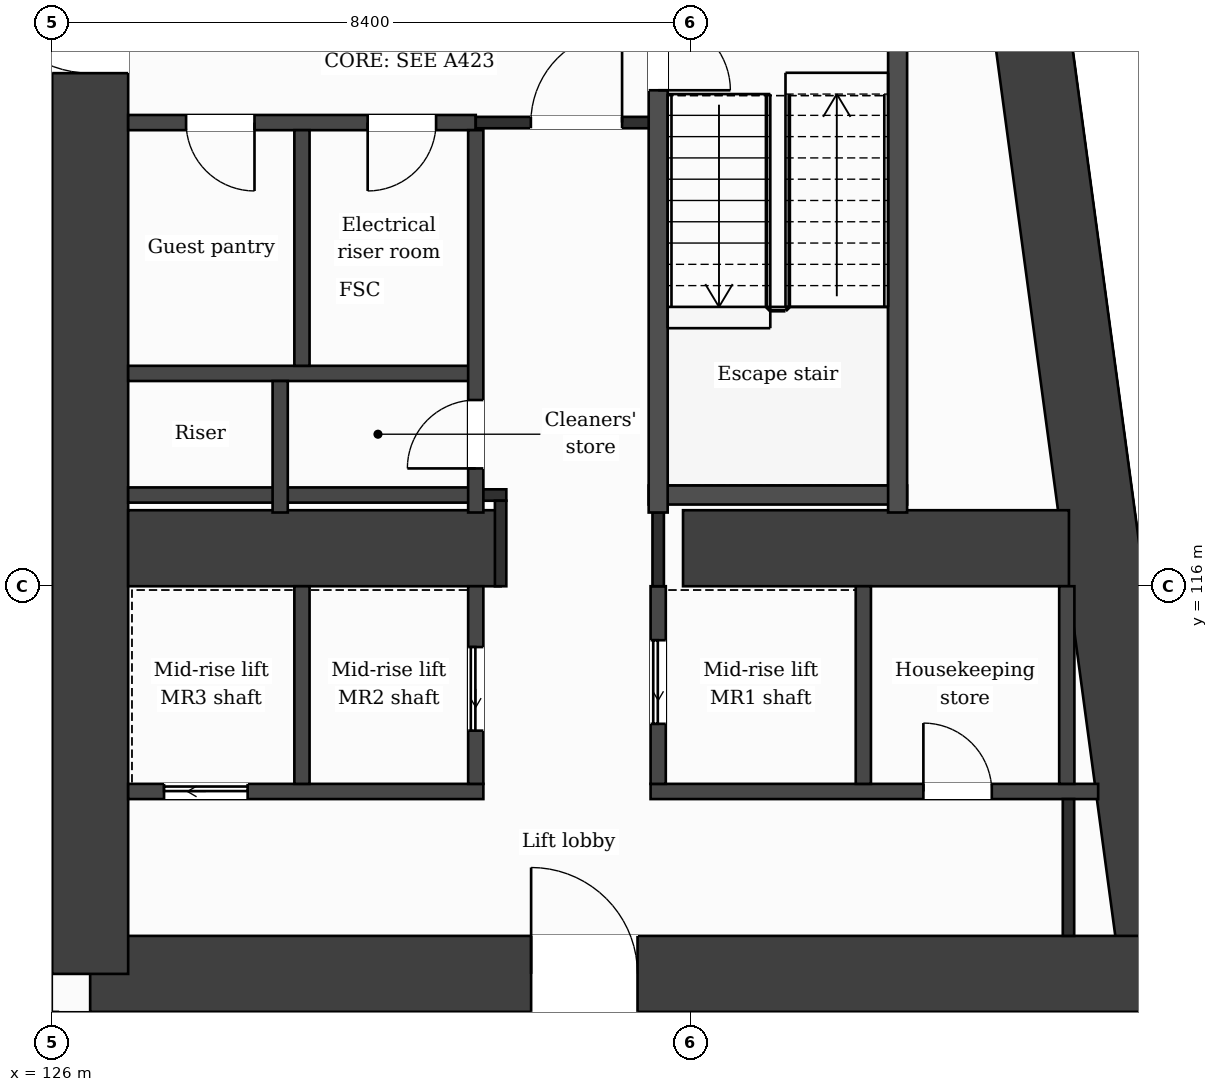
"""IFC4 building model, lengths in metres.
Left out: names, types, materials, properties, quantities, classifications, styles, units other than length and angle.
Written with IfcOpenShell. Run it as: python <this file> out.ifc"""

import sys

from ifc_helpers import new_model, si_unit, direction, frame, frame_2d, origin, place, context, subcontext, project, spatial, rectangle, extrude, element, fill, save


model = new_model("IFC4")
c1 = context("Model", 3, precision=1e-05, world=origin(), true_north=direction((0.0, 1.0)))
c2 = subcontext(c1, "Body", "Model", "MODEL_VIEW")
j1 = project(units=[si_unit("LENGTHUNIT", "METRE"), si_unit("PLANEANGLEUNIT", "RADIAN")], contexts=[c1])
p1 = place(None, origin())
s1 = spatial("IfcSite", under=j1, at=p1, CompositionType="ELEMENT")
p2 = place(p1, origin())
s2 = spatial("IfcBuilding", under=s1, at=p2, CompositionType="ELEMENT")
p3 = place(p2, frame((0.0, 0.0, 98.4)))
s3 = spatial("IfcBuildingStorey", under=s2, at=p3, CompositionType="ELEMENT", Elevation=98.4)
p4 = place(p3, frame((137.732, 131.9, 0.0), z_axis=(0.0, 0.0, 1.0), x_axis=(0.133411141623, -0.991060778808, 0.0)))
e1 = element("IfcWall", 1, at=p4, inside=s3, PredefinedType="SHEAR", context=c2, shape_type="SweptSolid", body=[
    extrude(rectangle(XDim=21.189, YDim=1.0, at=frame_2d((10.595, 0.0))), origin(), (0.0, 0.0, 1.0), 3.7),
])
p5 = place(p3, frame((140.559, 110.9, 0.0), z_axis=(0.0, 0.0, 1.0), x_axis=(-1.0, 0.0, 0.0)))
e2 = element("IfcWall", 2, at=p5, inside=s3, PredefinedType="SHEAR", context=c2, shape_type="SweptSolid", body=[
    extrude(rectangle(XDim=14.059, YDim=1.0, at=frame_2d((7.029, 0.0))), origin(), (0.0, 0.0, 1.0), 3.7),
])
p6 = place(p5, frame((6.858, 0.0, 0.0)))
e3 = element("IfcOpeningElement", 3, at=p6, cuts=e2, PredefinedType="OPENING", context=c2, shape_type="SweptSolid", body=[
    extrude(rectangle(XDim=1.4, YDim=2.1, at=frame_2d((0.7, 1.05))), frame((0.0, 0.51, 0.0), z_axis=(0.0, -1.0, 0.0), x_axis=(1.0, 0.0, 0.0)), (0.0, 0.0, 1.0), 1.02),
])
p7 = place(p3, frame((126.5, 110.9, 0.0), z_axis=(0.0, 0.0, 1.0), x_axis=(0.0, 1.0, 0.0)))
e4 = element("IfcWall", 4, at=p7, inside=s3, PredefinedType="SHEAR", context=c2, shape_type="SweptSolid", body=[
    extrude(rectangle(XDim=21.0, YDim=1.0, at=frame_2d((10.5, 0.0))), origin(), (0.0, 0.0, 1.0), 3.7),
])
p8 = place(p7, frame((11.85, 0.0, 0.0)))
e5 = element("IfcOpeningElement", 5, at=p8, cuts=e4, PredefinedType="OPENING", context=c2, shape_type="SweptSolid", body=[
    extrude(rectangle(XDim=1.4, YDim=2.1, at=frame_2d((0.7, 1.05))), frame((0.0, 0.51, 0.0), z_axis=(0.0, -1.0, 0.0), x_axis=(1.0, 0.0, 0.0)), (0.0, 0.0, 1.0), 1.02),
])
p9 = place(p3, frame((127.0, 116.5, 0.0), z_axis=(0.0, 0.0, 1.0), x_axis=(1.0, 0.0, 0.0)))
e6 = element("IfcWall", 6, at=p9, inside=s3, PredefinedType="SHEAR", context=c2, shape_type="SweptSolid", body=[
    extrude(rectangle(XDim=4.9, YDim=1.0, at=frame_2d((2.45, 0.0))), origin(), (0.0, 0.0, 1.0), 3.7),
])
p10 = place(p3, frame((134.3, 116.5, 0.0), z_axis=(0.0, 0.0, 1.0), x_axis=(1.0, 0.0, 0.0)))
e7 = element("IfcWall", 7, at=p10, inside=s3, PredefinedType="SHEAR", context=c2, shape_type="SweptSolid", body=[
    extrude(rectangle(XDim=5.077, YDim=1.0, at=frame_2d((2.539, 0.0))), origin(), (0.0, 0.0, 1.0), 3.7),
])
p11 = place(p3, frame((140.348, 103.85, 0.0), z_axis=(0.0, 0.0, 1.0), x_axis=(-0.133431549479, 0.991058031401, 0.0)))
e8 = element("IfcWall", 8, at=p11, inside=s3, PredefinedType="SOLIDWALL", context=c2, shape_type="SweptSolid", body=[
    extrude(rectangle(XDim=6.609, YDim=0.3, at=frame_2d((3.304, 0.0))), origin(), (0.0, 0.0, 1.0), 3.38),
])
p12 = place(p11, frame((0.737, 0.0, 0.9)))
e9 = element("IfcOpeningElement", 9, at=p12, cuts=e8, PredefinedType="OPENING", context=c2, shape_type="SweptSolid", body=[
    extrude(rectangle(XDim=1.2, YDim=2.1, at=frame_2d((0.6, 1.05))), frame((0.0, 0.16, 0.0), z_axis=(0.0, -1.0, 0.0), x_axis=(1.0, 0.0, 0.0)), (0.0, 0.0, 1.0), 0.32),
])
p13 = place(p11, frame((3.991, 0.0, 0.0)))
e10 = element("IfcOpeningElement", 10, at=p13, cuts=e8, PredefinedType="OPENING", context=c2, shape_type="SweptSolid", body=[
    extrude(rectangle(XDim=1.2, YDim=2.4, at=frame_2d((0.6, 1.2))), frame((0.0, 0.16, 0.0), z_axis=(0.0, -1.0, 0.0), x_axis=(1.0, 0.0, 0.0)), (0.0, 0.0, 1.0), 0.32),
])
p14 = place(p3, frame((127.0, 113.3, 0.0), z_axis=(0.0, 0.0, 1.0), x_axis=(1.0, 0.0, 0.0)))
e11 = element("IfcWall", 11, at=p14, inside=s3, PredefinedType="PARTITIONING", context=c2, shape_type="SweptSolid", body=[
    extrude(rectangle(XDim=4.673, YDim=0.2, at=frame_2d((2.336, 0.0))), origin(), (0.0, 0.0, 1.0), 3.38),
])
p15 = place(p14, frame((0.472, 0.0, 0.0)))
e12 = element("IfcOpeningElement", 12, at=p15, cuts=e11, PredefinedType="OPENING", context=c2, shape_type="SweptSolid", body=[
    extrude(rectangle(XDim=1.1, YDim=2.1, at=frame_2d((0.55, 1.05))), frame((0.0, 0.11, 0.0), z_axis=(0.0, -1.0, 0.0), x_axis=(1.0, 0.0, 0.0)), (0.0, 0.0, 1.0), 0.22),
])
p16 = place(p3, frame((133.873, 113.3, 0.0), z_axis=(0.0, 0.0, 1.0), x_axis=(1.0, 0.0, 0.0)))
e13 = element("IfcWall", 13, at=p16, inside=s3, PredefinedType="PARTITIONING", context=c2, shape_type="SweptSolid", body=[
    extrude(rectangle(XDim=5.888, YDim=0.2, at=frame_2d((2.944, 0.0))), origin(), (0.0, 0.0, 1.0), 3.38),
])
p17 = place(p16, frame((3.589, 0.0, 0.0)))
e14 = element("IfcOpeningElement", 14, at=p17, cuts=e13, PredefinedType="OPENING", context=c2, shape_type="SweptSolid", body=[
    extrude(rectangle(XDim=0.9, YDim=2.1, at=frame_2d((0.45, 1.05))), frame((0.0, 0.11, 0.0), z_axis=(0.0, -1.0, 0.0), x_axis=(1.0, 0.0, 0.0)), (0.0, 0.0, 1.0), 0.22),
])
p18 = place(p3, frame((127.0, 117.2, 0.0), z_axis=(0.0, 0.0, 1.0), x_axis=(1.0, 0.0, 0.0)))
e15 = element("IfcWall", 15, at=p18, inside=s3, PredefinedType="PARTITIONING", context=c2, shape_type="SweptSolid", body=[
    extrude(rectangle(XDim=4.573, YDim=0.2, at=frame_2d((2.287, 0.0))), origin(), (0.0, 0.0, 1.0), 3.38),
])
p19 = place(p3, frame((131.573, 117.2, 0.0), z_axis=(0.0, 0.0, 1.0), x_axis=(1.0, 0.0, 0.0)))
e16 = element("IfcWall", 16, at=p19, inside=s3, PredefinedType="PARTITIONING", context=c2, shape_type="SweptSolid", body=[
    extrude(rectangle(XDim=0.402, YDim=0.15, at=frame_2d((0.201, 0.0))), origin(), (0.0, 0.0, 1.0), 3.38),
])
p20 = place(p3, frame((133.848, 117.2, 0.0), z_axis=(0.0, 0.0, 1.0), x_axis=(1.0, 0.0, 0.0)))
e17 = element("IfcWall", 17, at=p20, inside=s3, PredefinedType="PARTITIONING", context=c2, shape_type="SweptSolid", body=[
    extrude(rectangle(XDim=3.4, YDim=0.25, at=frame_2d((1.7, 0.0))), origin(), (0.0, 0.0, 1.0), 3.38),
])
p21 = place(p3, frame((127.0, 118.8, 0.0), z_axis=(0.0, 0.0, 1.0), x_axis=(1.0, 0.0, 0.0)))
e18 = element("IfcWall", 18, at=p21, inside=s3, PredefinedType="PARTITIONING", context=c2, shape_type="SweptSolid", body=[
    extrude(rectangle(XDim=4.573, YDim=0.2, at=frame_2d((2.287, 0.0))), origin(), (0.0, 0.0, 1.0), 3.38),
])
p22 = place(p3, frame((127.0, 122.1, 0.0), z_axis=(0.0, 0.0, 1.0), x_axis=(1.0, 0.0, 0.0)))
e19 = element("IfcWall", 19, at=p22, inside=s3, PredefinedType="PARTITIONING", context=c2, shape_type="SweptSolid", body=[
    extrude(rectangle(XDim=4.573, YDim=0.2, at=frame_2d((2.287, 0.0))), origin(), (0.0, 0.0, 1.0), 3.38),
])
p23 = place(p22, frame((3.151, 0.0, 0.0)))
e20 = element("IfcOpeningElement", 20, at=p23, cuts=e19, PredefinedType="OPENING", context=c2, shape_type="SweptSolid", body=[
    extrude(rectangle(XDim=0.9, YDim=2.1, at=frame_2d((0.45, 1.05))), frame((0.0, 0.11, 0.0), z_axis=(0.0, -1.0, 0.0), x_axis=(1.0, 0.0, 0.0)), (0.0, 0.0, 1.0), 0.22),
])
p24 = place(p22, frame((0.762, 0.0, 0.0)))
e21 = element("IfcOpeningElement", 21, at=p24, cuts=e19, PredefinedType="OPENING", context=c2, shape_type="SweptSolid", body=[
    extrude(rectangle(XDim=0.9, YDim=2.1, at=frame_2d((0.45, 1.05))), frame((0.0, 0.11, 0.0), z_axis=(0.0, -1.0, 0.0), x_axis=(1.0, 0.0, 0.0)), (0.0, 0.0, 1.0), 0.22),
])
p25 = place(p3, frame((131.573, 122.1, 0.0), z_axis=(0.0, 0.0, 1.0), x_axis=(1.0, 0.0, 0.0)))
e22 = element("IfcWall", 22, at=p25, inside=s3, PredefinedType="PARTITIONING", context=c2, shape_type="SweptSolid", body=[
    extrude(rectangle(XDim=2.4, YDim=0.15, at=frame_2d((1.2, 0.0))), origin(), (0.0, 0.0, 1.0), 3.38),
])
p26 = place(p25, frame((0.725, 0.0, 0.0)))
e23 = element("IfcOpeningElement", 23, at=p26, cuts=e22, PredefinedType="OPENING", context=c2, shape_type="SweptSolid", body=[
    extrude(rectangle(XDim=1.2, YDim=2.1, at=frame_2d((0.6, 1.05))), frame((0.0, 0.085, 0.0), z_axis=(0.0, -1.0, 0.0), x_axis=(1.0, 0.0, 0.0)), (0.0, 0.0, 1.0), 0.17),
])
p27 = place(p3, frame((100.8, 122.45, 0.0), z_axis=(0.0, 0.0, 1.0), x_axis=(1.0, 0.0, 0.0)))
e24 = element("IfcWall", 24, at=p27, inside=s3, PredefinedType="PARTITIONING", context=c2, shape_type="SweptSolid", body=[
    extrude(rectangle(XDim=25.2, YDim=0.15, at=frame_2d((12.6, 0.0))), origin(), (0.0, 0.0, 1.0), 3.38),
])
p28 = place(p3, frame((126.0, 109.075, 0.0), z_axis=(0.0, 0.0, 1.0), x_axis=(0.0, 1.0, 0.0)))
e25 = element("IfcWall", 25, at=p28, inside=s3, PredefinedType="PARTITIONING", context=c2, shape_type="SweptSolid", body=[
    extrude(rectangle(XDim=1.325, YDim=0.15, at=frame_2d((0.663, 0.0))), origin(), (0.0, 0.0, 1.0), 3.38),
])
p29 = place(p3, frame((129.0, 116.97, 0.0), z_axis=(0.0, 0.0, 1.0), x_axis=(0.0, 1.0, 0.0)))
e26 = element("IfcWall", 26, at=p29, inside=s3, PredefinedType="PARTITIONING", context=c2, shape_type="SweptSolid", body=[
    extrude(rectangle(XDim=1.73, YDim=0.2, at=frame_2d((0.865, 0.0))), origin(), (0.0, 0.0, 1.0), 3.38),
])
p30 = place(p3, frame((129.287, 113.4, 0.0), z_axis=(0.0, 0.0, 1.0), x_axis=(0.0, 1.0, 0.0)))
e27 = element("IfcWall", 27, at=p30, inside=s3, PredefinedType="PARTITIONING", context=c2, shape_type="SweptSolid", body=[
    extrude(rectangle(XDim=2.6, YDim=0.2, at=frame_2d((1.3, 0.0))), origin(), (0.0, 0.0, 1.0), 3.38),
])
p31 = place(p3, frame((129.287, 118.9, 0.0), z_axis=(0.0, 0.0, 1.0), x_axis=(0.0, 1.0, 0.0)))
e28 = element("IfcWall", 28, at=p31, inside=s3, PredefinedType="PARTITIONING", context=c2, shape_type="SweptSolid", body=[
    extrude(rectangle(XDim=3.1, YDim=0.2, at=frame_2d((1.55, 0.0))), origin(), (0.0, 0.0, 1.0), 3.38),
])
p32 = place(p3, frame((131.573, 113.4, 0.0), z_axis=(0.0, 0.0, 1.0), x_axis=(0.0, 1.0, 0.0)))
e29 = element("IfcWall", 29, at=p32, inside=s3, PredefinedType="PARTITIONING", context=c2, shape_type="SweptSolid", body=[
    extrude(rectangle(XDim=2.6, YDim=0.2, at=frame_2d((1.3, 0.0))), origin(), (0.0, 0.0, 1.0), 3.38),
])
p33 = place(p32, frame((0.7, 0.0, 0.0)))
e30 = element("IfcOpeningElement", 30, at=p33, cuts=e29, PredefinedType="OPENING", context=c2, shape_type="SweptSolid", body=[
    extrude(rectangle(XDim=1.1, YDim=2.1, at=frame_2d((0.55, 1.05))), frame((0.0, 0.11, 0.0), z_axis=(0.0, -1.0, 0.0), x_axis=(1.0, 0.0, 0.0)), (0.0, 0.0, 1.0), 0.22),
])
p34 = place(p3, frame((131.573, 116.97, 0.0), z_axis=(0.0, 0.0, 1.0), x_axis=(0.0, 1.0, 0.0)))
e31 = element("IfcWall", 31, at=p34, inside=s3, PredefinedType="PARTITIONING", context=c2, shape_type="SweptSolid", body=[
    extrude(rectangle(XDim=5.03, YDim=0.2, at=frame_2d((2.515, 0.0))), origin(), (0.0, 0.0, 1.0), 3.38),
])
p35 = place(p34, frame((0.58, 0.0, 0.0)))
e32 = element("IfcOpeningElement", 32, at=p35, cuts=e31, PredefinedType="OPENING", context=c2, shape_type="SweptSolid", body=[
    extrude(rectangle(XDim=0.9, YDim=2.1, at=frame_2d((0.45, 1.05))), frame((0.0, 0.11, 0.0), z_axis=(0.0, -1.0, 0.0), x_axis=(1.0, 0.0, 0.0)), (0.0, 0.0, 1.0), 0.22),
])
p36 = place(p3, frame((131.9, 116.0, 0.0), z_axis=(0.0, 0.0, 1.0), x_axis=(0.0, 1.0, 0.0)))
e33 = element("IfcWall", 33, at=p36, inside=s3, PredefinedType="PARTITIONING", context=c2, shape_type="SweptSolid", body=[
    extrude(rectangle(XDim=1.125, YDim=0.15, at=frame_2d((0.562, 0.0))), origin(), (0.0, 0.0, 1.0), 3.38),
])
p37 = place(p3, frame((133.973, 113.4, 0.0), z_axis=(0.0, 0.0, 1.0), x_axis=(0.0, 1.0, 0.0)))
e34 = element("IfcWall", 34, at=p37, inside=s3, PredefinedType="PARTITIONING", context=c2, shape_type="SweptSolid", body=[
    extrude(rectangle(XDim=2.6, YDim=0.2, at=frame_2d((1.3, 0.0))), origin(), (0.0, 0.0, 1.0), 3.38),
])
p38 = place(p37, frame((0.79, 0.0, 0.0)))
e35 = element("IfcOpeningElement", 35, at=p38, cuts=e34, PredefinedType="OPENING", context=c2, shape_type="SweptSolid", body=[
    extrude(rectangle(XDim=1.1, YDim=2.1, at=frame_2d((0.55, 1.05))), frame((0.0, 0.11, 0.0), z_axis=(0.0, -1.0, 0.0), x_axis=(1.0, 0.0, 0.0)), (0.0, 0.0, 1.0), 0.22),
])
p39 = place(p3, frame((133.973, 116.0, 0.0), z_axis=(0.0, 0.0, 1.0), x_axis=(0.0, 1.0, 0.0)))
e36 = element("IfcWall", 36, at=p39, inside=s3, PredefinedType="PARTITIONING", context=c2, shape_type="SweptSolid", body=[
    extrude(rectangle(XDim=0.97, YDim=0.15, at=frame_2d((0.485, 0.0))), origin(), (0.0, 0.0, 1.0), 3.38),
])
p40 = place(p3, frame((133.973, 116.97, 0.0), z_axis=(0.0, 0.0, 1.0), x_axis=(0.0, 1.0, 0.0)))
e37 = element("IfcWall", 37, at=p40, inside=s3, PredefinedType="PARTITIONING", context=c2, shape_type="SweptSolid", body=[
    extrude(rectangle(XDim=6.855, YDim=0.25, at=frame_2d((3.427, 0.0))), origin(), (0.0, 0.0, 1.0), 3.38),
])
p41 = place(p40, frame((5.555, 0.0, 0.0)))
e38 = element("IfcOpeningElement", 38, at=p41, cuts=e37, PredefinedType="OPENING", context=c2, shape_type="SweptSolid", body=[
    extrude(rectangle(XDim=0.95, YDim=2.1, at=frame_2d((0.475, 1.05))), frame((0.0, 0.135, 0.0), z_axis=(0.0, -1.0, 0.0), x_axis=(1.0, 0.0, 0.0)), (0.0, 0.0, 1.0), 0.27),
])
p42 = place(p3, frame((136.672, 113.4, 0.0), z_axis=(0.0, 0.0, 1.0), x_axis=(0.0, 1.0, 0.0)))
e39 = element("IfcWall", 39, at=p42, inside=s3, PredefinedType="PARTITIONING", context=c2, shape_type="SweptSolid", body=[
    extrude(rectangle(XDim=2.6, YDim=0.2, at=frame_2d((1.3, 0.0))), origin(), (0.0, 0.0, 1.0), 3.38),
])
p43 = place(p3, frame((137.123, 116.97, 0.0), z_axis=(0.0, 0.0, 1.0), x_axis=(0.0, 1.0, 0.0)))
e40 = element("IfcWall", 40, at=p43, inside=s3, PredefinedType="PARTITIONING", context=c2, shape_type="SweptSolid", body=[
    extrude(rectangle(XDim=6.855, YDim=0.25, at=frame_2d((3.427, 0.0))), origin(), (0.0, 0.0, 1.0), 3.38),
])
p44 = place(p3, frame((139.349, 113.4, 0.0), z_axis=(0.0, 0.0, 1.0), x_axis=(0.0, 1.0, 0.0)))
e41 = element("IfcWall", 41, at=p44, inside=s3, PredefinedType="PARTITIONING", context=c2, shape_type="SweptSolid", body=[
    extrude(rectangle(XDim=2.6, YDim=0.2, at=frame_2d((1.3, 0.0))), origin(), (0.0, 0.0, 1.0), 3.38),
])
p45 = place(p3, frame((139.371, 111.4, 0.0), z_axis=(0.0, 0.0, 1.0), x_axis=(0.0, 1.0, 0.0)))
e42 = element("IfcWall", 42, at=p45, inside=s3, PredefinedType="PARTITIONING", context=c2, shape_type="SweptSolid", body=[
    extrude(rectangle(XDim=1.8, YDim=0.15, at=frame_2d((0.9, 0.0))), origin(), (0.0, 0.0, 1.0), 3.38),
])
p46 = place(p26, origin())
e43 = element("IfcDoor", 43, at=p46, inside=s3, OperationType="SINGLE_SWING_RIGHT", PredefinedType="DOOR", context=c2, shape_type="SweptSolid", body=[
    extrude(rectangle(XDim=1.2, YDim=2.1, at=frame_2d((0.6, 1.05))), frame((0.0, 0.025, 0.0), z_axis=(0.0, -1.0, 0.0), x_axis=(1.0, 0.0, 0.0)), (0.0, 0.0, 1.0), 0.05),
])
fill(e23, e43)
p47 = place(p23, origin())
e44 = element("IfcDoor", 44, at=p47, inside=s3, OperationType="SINGLE_SWING_LEFT", PredefinedType="DOOR", context=c2, shape_type="SweptSolid", body=[
    extrude(rectangle(XDim=0.9, YDim=2.1, at=frame_2d((0.45, 1.05))), frame((0.0, 0.025, 0.0), z_axis=(0.0, -1.0, 0.0), x_axis=(1.0, 0.0, 0.0)), (0.0, 0.0, 1.0), 0.05),
])
fill(e20, e44)
p48 = place(p24, origin())
e45 = element("IfcDoor", 45, at=p48, inside=s3, OperationType="SINGLE_SWING_RIGHT", PredefinedType="DOOR", context=c2, shape_type="SweptSolid", body=[
    extrude(rectangle(XDim=0.9, YDim=2.1, at=frame_2d((0.45, 1.05))), frame((0.0, 0.025, 0.0), z_axis=(0.0, -1.0, 0.0), x_axis=(1.0, 0.0, 0.0)), (0.0, 0.0, 1.0), 0.05),
])
fill(e21, e45)
p49 = place(p41, origin())
e46 = element("IfcDoor", 46, at=p49, inside=s3, OperationType="SINGLE_SWING_LEFT", PredefinedType="DOOR", context=c2, shape_type="SweptSolid", body=[
    extrude(rectangle(XDim=0.95, YDim=2.1, at=frame_2d((0.475, 1.05))), frame((0.0, 0.025, 0.0), z_axis=(0.0, -1.0, 0.0), x_axis=(1.0, 0.0, 0.0)), (0.0, 0.0, 1.0), 0.05),
])
fill(e38, e46)
p50 = place(p35, origin())
e47 = element("IfcDoor", 47, at=p50, inside=s3, OperationType="SINGLE_SWING_LEFT", PredefinedType="DOOR", context=c2, shape_type="SweptSolid", body=[
    extrude(rectangle(XDim=0.9, YDim=2.1, at=frame_2d((0.45, 1.05))), frame((0.0, 0.025, 0.0), z_axis=(0.0, -1.0, 0.0), x_axis=(1.0, 0.0, 0.0)), (0.0, 0.0, 1.0), 0.05),
])
fill(e32, e47)
p51 = place(p38, origin())
e48 = element("IfcDoor", 48, at=p51, inside=s3, OperationType="SLIDING_TO_LEFT", PredefinedType="DOOR", context=c2, shape_type="SweptSolid", body=[
    extrude(rectangle(XDim=1.1, YDim=2.1, at=frame_2d((0.55, 1.05))), frame((0.0, 0.025, 0.0), z_axis=(0.0, -1.0, 0.0), x_axis=(1.0, 0.0, 0.0)), (0.0, 0.0, 1.0), 0.05),
])
fill(e35, e48)
p52 = place(p33, origin())
e49 = element("IfcDoor", 49, at=p52, inside=s3, OperationType="SLIDING_TO_LEFT", PredefinedType="DOOR", context=c2, shape_type="SweptSolid", body=[
    extrude(rectangle(XDim=1.1, YDim=2.1, at=frame_2d((0.55, 1.05))), frame((0.0, 0.025, 0.0), z_axis=(0.0, -1.0, 0.0), x_axis=(1.0, 0.0, 0.0)), (0.0, 0.0, 1.0), 0.05),
])
fill(e30, e49)
p53 = place(p15, origin())
e50 = element("IfcDoor", 50, at=p53, inside=s3, OperationType="SLIDING_TO_LEFT", PredefinedType="DOOR", context=c2, shape_type="SweptSolid", body=[
    extrude(rectangle(XDim=1.1, YDim=2.1, at=frame_2d((0.55, 1.05))), frame((0.0, 0.025, 0.0), z_axis=(0.0, -1.0, 0.0), x_axis=(1.0, 0.0, 0.0)), (0.0, 0.0, 1.0), 0.05),
])
fill(e12, e50)
p54 = place(p17, origin())
e51 = element("IfcDoor", 51, at=p54, inside=s3, OperationType="SINGLE_SWING_LEFT", PredefinedType="DOOR", context=c2, shape_type="SweptSolid", body=[
    extrude(rectangle(XDim=0.9, YDim=2.1, at=frame_2d((0.45, 1.05))), frame((0.0, 0.025, 0.0), z_axis=(0.0, -1.0, 0.0), x_axis=(1.0, 0.0, 0.0)), (0.0, 0.0, 1.0), 0.05),
])
fill(e14, e51)
p55 = place(p6, origin())
e52 = element("IfcDoor", 52, at=p55, inside=s3, OperationType="SINGLE_SWING_RIGHT", PredefinedType="DOOR", context=c2, shape_type="SweptSolid", body=[
    extrude(rectangle(XDim=1.4, YDim=2.1, at=frame_2d((0.7, 1.05))), frame((0.0, 0.025, 0.0), z_axis=(0.0, -1.0, 0.0), x_axis=(1.0, 0.0, 0.0)), (0.0, 0.0, 1.0), 0.05),
])
fill(e3, e52)
p56 = place(p8, origin())
e53 = element("IfcDoor", 53, at=p56, inside=s3, OperationType="SINGLE_SWING_RIGHT", PredefinedType="DOOR", context=c2, shape_type="SweptSolid", body=[
    extrude(rectangle(XDim=1.4, YDim=2.1, at=frame_2d((0.7, 1.05))), frame((0.0, 0.025, 0.0), z_axis=(0.0, -1.0, 0.0), x_axis=(1.0, 0.0, 0.0)), (0.0, 0.0, 1.0), 0.05),
])
fill(e5, e53)
save(model, sys.argv[1])
